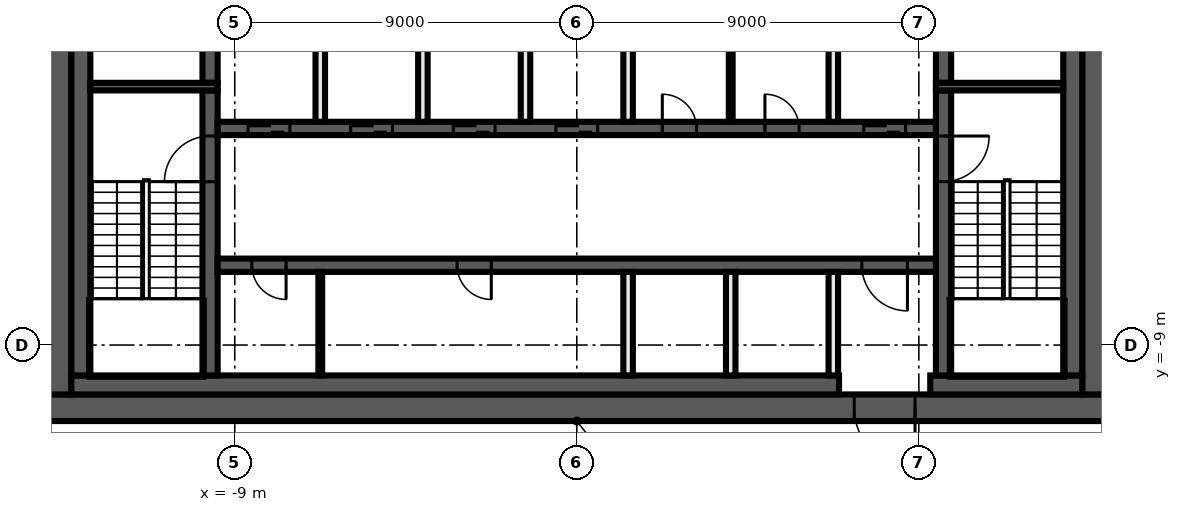
"""IFC4 building model, lengths in metres.
Left out: names, types, materials, properties, quantities, classifications, styles, units other than length and angle.
Written with IfcOpenShell. Run it as: python <this file> out.ifc"""

import sys

from ifc_helpers import new_model, si_unit, direction, frame, frame_2d, origin, place, context, subcontext, project, spatial, rectangle, extrude, element, fill, save


model = new_model("IFC4")
c1 = context("Model", 3, precision=1e-05, world=origin(), true_north=direction((0.0, 1.0)))
c2 = subcontext(c1, "Body", "Model", "MODEL_VIEW")
j1 = project(units=[si_unit("LENGTHUNIT", "METRE"), si_unit("PLANEANGLEUNIT", "RADIAN")], contexts=[c1])
p1 = place(None, origin())
s1 = spatial("IfcSite", under=j1, at=p1, CompositionType="ELEMENT")
p2 = place(p1, origin())
s2 = spatial("IfcBuilding", under=s1, at=p2, CompositionType="ELEMENT")
p3 = place(p2, frame((0.0, 0.0, 253.8)))
s3 = spatial("IfcBuildingStorey", under=s2, at=p3, CompositionType="ELEMENT", Elevation=253.8)
p4 = place(p3, frame((14.0, -10.65, 0.0), z_axis=(0.0, 0.0, 1.0), x_axis=(-1.0, 0.0, 0.0)))
e1 = element("IfcWall", 1, at=p4, inside=s3, PredefinedType="SHEAR", context=c2, shape_type="SweptSolid", body=[
    extrude(rectangle(XDim=28.0, YDim=0.7, at=frame_2d((14.0, 0.0))), origin(), (0.0, 0.0, 1.0), 3.82),
])
p5 = place(p4, frame((5.1, 0.0, 0.0)))
e2 = element("IfcOpeningElement", 2, at=p5, cuts=e1, PredefinedType="OPENING", context=c2, shape_type="SweptSolid", body=[
    extrude(rectangle(XDim=1.6, YDim=2.1, at=frame_2d((0.8, 1.05))), frame((0.0, 0.36, 0.0), z_axis=(0.0, -1.0, 0.0), x_axis=(1.0, 0.0, 0.0)), (0.0, 0.0, 1.0), 0.72),
])
for number, where, z_axis, x_axis in (
    (3, (13.65, 10.3, 0.0), (0.0, 0.0, 1.0), (0.0, -1.0, 0.0)),
    (4, (-13.65, -10.3, 0.0), (0.0, 0.0, 1.0), (0.0, 1.0, 0.0)),
):
    element("IfcWall", number, at=place(p3, frame(where, z_axis=z_axis, x_axis=x_axis)), inside=s3, PredefinedType="SHEAR", context=c2, shape_type="SweptSolid", body=[
        extrude(rectangle(XDim=20.6, YDim=0.7, at=frame_2d((10.3, 0.0))), origin(), (0.0, 0.0, 1.0), 3.82),
    ])
p6 = place(p3, frame((13.3, -10.05, 0.0), z_axis=(0.0, 0.0, 1.0), x_axis=(-1.0, 0.0, 0.0)))
e5 = element("IfcWall", 5, at=p6, inside=s3, PredefinedType="SHEAR", context=c2, shape_type="SweptSolid", body=[
    extrude(rectangle(XDim=4.0, YDim=0.5, at=frame_2d((2.0, 0.0))), origin(), (0.0, 0.0, 1.0), 3.82),
])
p7 = place(p3, frame((6.9, -10.05, 0.0), z_axis=(0.0, 0.0, 1.0), x_axis=(-1.0, 0.0, 0.0)))
e6 = element("IfcWall", 6, at=p7, inside=s3, PredefinedType="SHEAR", context=c2, shape_type="SweptSolid", body=[
    extrude(rectangle(XDim=20.2, YDim=0.5, at=frame_2d((10.1, 0.0))), origin(), (0.0, 0.0, 1.0), 3.82),
])
for number, where, z_axis, x_axis in (
    (7, (13.05, 9.8, 0.0), (0.0, 0.0, 1.0), (0.0, -1.0, 0.0)),
    (8, (-13.05, -9.8, 0.0), (0.0, 0.0, 1.0), (0.0, 1.0, 0.0)),
):
    element("IfcWall", number, at=place(p3, frame(where, z_axis=z_axis, x_axis=x_axis)), inside=s3, PredefinedType="SHEAR", context=c2, shape_type="SweptSolid", body=[
        extrude(rectangle(XDim=19.6, YDim=0.5, at=frame_2d((9.8, 0.0))), origin(), (0.0, 0.0, 1.0), 3.82),
    ])
p8 = place(p3, frame((9.65, -2.3, 0.0), z_axis=(0.0, 0.0, 1.0), x_axis=(0.0, -1.0, 0.0)))
e9 = element("IfcWall", 9, at=p8, inside=s3, PredefinedType="SHEAR", context=c2, shape_type="SweptSolid", body=[
    extrude(rectangle(XDim=7.5, YDim=0.4, at=frame_2d((3.75, 0.0))), origin(), (0.0, 0.0, 1.0), 3.82),
])
p9 = place(p8, frame((1.2, 0.0, 0.0)))
e10 = element("IfcOpeningElement", 10, at=p9, cuts=e9, PredefinedType="OPENING", context=c2, shape_type="SweptSolid", body=[
    extrude(rectangle(XDim=1.2, YDim=2.1, at=frame_2d((0.6, 1.05))), frame((0.0, 0.21, 0.0), z_axis=(0.0, -1.0, 0.0), x_axis=(1.0, 0.0, 0.0)), (0.0, 0.0, 1.0), 0.42),
])
p10 = place(p3, frame((9.65, 2.1, 0.0), z_axis=(0.0, 0.0, 1.0), x_axis=(0.0, -1.0, 0.0)))
e11 = element("IfcWall", 11, at=p10, inside=s3, PredefinedType="SHEAR", context=c2, shape_type="SweptSolid", body=[
    extrude(rectangle(XDim=4.2, YDim=0.4, at=frame_2d((2.1, 0.0))), origin(), (0.0, 0.0, 1.0), 3.82),
])
p11 = place(p10, frame((0.15, 0.0, 0.0)))
e12 = element("IfcOpeningElement", 12, at=p11, cuts=e11, PredefinedType="OPENING", context=c2, shape_type="SweptSolid", body=[
    extrude(rectangle(XDim=0.9, YDim=2.1, at=frame_2d((0.45, 1.05))), frame((0.0, 0.21, 0.0), z_axis=(0.0, -1.0, 0.0), x_axis=(1.0, 0.0, 0.0)), (0.0, 0.0, 1.0), 0.42),
])
p12 = place(p3, frame((-9.65, -9.8, 0.0), z_axis=(0.0, 0.0, 1.0), x_axis=(0.0, 1.0, 0.0)))
e13 = element("IfcWall", 13, at=p12, inside=s3, PredefinedType="SHEAR", context=c2, shape_type="SweptSolid", body=[
    extrude(rectangle(XDim=7.5, YDim=0.4, at=frame_2d((3.75, 0.0))), origin(), (0.0, 0.0, 1.0), 3.82),
])
p13 = place(p12, frame((5.1, 0.0, 0.0)))
e14 = element("IfcOpeningElement", 14, at=p13, cuts=e13, PredefinedType="OPENING", context=c2, shape_type="SweptSolid", body=[
    extrude(rectangle(XDim=1.2, YDim=2.1, at=frame_2d((0.6, 1.05))), frame((0.0, 0.21, 0.0), z_axis=(0.0, -1.0, 0.0), x_axis=(1.0, 0.0, 0.0)), (0.0, 0.0, 1.0), 0.42),
])
p14 = place(p3, frame((-9.65, -2.1, 0.0), z_axis=(0.0, 0.0, 1.0), x_axis=(0.0, 1.0, 0.0)))
e15 = element("IfcWall", 15, at=p14, inside=s3, PredefinedType="SHEAR", context=c2, shape_type="SweptSolid", body=[
    extrude(rectangle(XDim=4.2, YDim=0.4, at=frame_2d((2.1, 0.0))), origin(), (0.0, 0.0, 1.0), 3.82),
])
for number, where, z_axis, x_axis in (
    (16, (9.45, -2.2, 0.0), (0.0, 0.0, 1.0), (1.0, 0.0, 0.0)),
    (17, (-9.45, -2.2, 0.0), (0.0, 0.0, 1.0), (-1.0, 0.0, 0.0)),
):
    element("IfcWall", number, at=place(p3, frame(where, z_axis=z_axis, x_axis=x_axis)), inside=s3, PredefinedType="SHEAR", context=c2, shape_type="SweptSolid", body=[
        extrude(rectangle(XDim=3.35, YDim=0.2, at=frame_2d((1.675, 0.0))), origin(), (0.0, 0.0, 1.0), 3.82),
    ])
p15 = place(p3, frame((-9.45, -3.3, 0.0), z_axis=(0.0, 0.0, 1.0), x_axis=(1.0, 0.0, 0.0)))
e18 = element("IfcWall", 18, at=p15, inside=s3, PredefinedType="SHEAR", context=c2, shape_type="SweptSolid", body=[
    extrude(rectangle(XDim=18.9, YDim=0.35, at=frame_2d((9.45, 0.0))), origin(), (0.0, 0.0, 1.0), 3.82),
])
p16 = place(p15, frame((0.8, 0.0, 0.0)))
e19 = element("IfcOpeningElement", 19, at=p16, cuts=e18, PredefinedType="OPENING", context=c2, shape_type="SweptSolid", body=[
    extrude(rectangle(XDim=1.1, YDim=2.1, at=frame_2d((0.55, 1.05))), frame((0.0, 0.185, 0.0), z_axis=(0.0, -1.0, 0.0), x_axis=(1.0, 0.0, 0.0)), (0.0, 0.0, 1.0), 0.37),
])
p17 = place(p15, frame((3.5, 0.0, 0.0)))
e20 = element("IfcOpeningElement", 20, at=p17, cuts=e18, PredefinedType="OPENING", context=c2, shape_type="SweptSolid", body=[
    extrude(rectangle(XDim=1.1, YDim=2.1, at=frame_2d((0.55, 1.05))), frame((0.0, 0.185, 0.0), z_axis=(0.0, -1.0, 0.0), x_axis=(1.0, 0.0, 0.0)), (0.0, 0.0, 1.0), 0.37),
])
p18 = place(p15, frame((6.2, 0.0, 0.0)))
e21 = element("IfcOpeningElement", 21, at=p18, cuts=e18, PredefinedType="OPENING", context=c2, shape_type="SweptSolid", body=[
    extrude(rectangle(XDim=1.1, YDim=2.1, at=frame_2d((0.55, 1.05))), frame((0.0, 0.185, 0.0), z_axis=(0.0, -1.0, 0.0), x_axis=(1.0, 0.0, 0.0)), (0.0, 0.0, 1.0), 0.37),
])
p19 = place(p15, frame((8.9, 0.0, 0.0)))
e22 = element("IfcOpeningElement", 22, at=p19, cuts=e18, PredefinedType="OPENING", context=c2, shape_type="SweptSolid", body=[
    extrude(rectangle(XDim=1.1, YDim=2.1, at=frame_2d((0.55, 1.05))), frame((0.0, 0.185, 0.0), z_axis=(0.0, -1.0, 0.0), x_axis=(1.0, 0.0, 0.0)), (0.0, 0.0, 1.0), 0.37),
])
p20 = place(p15, frame((17.0, 0.0, 0.0)))
e23 = element("IfcOpeningElement", 23, at=p20, cuts=e18, PredefinedType="OPENING", context=c2, shape_type="SweptSolid", body=[
    extrude(rectangle(XDim=1.1, YDim=2.1, at=frame_2d((0.55, 1.05))), frame((0.0, 0.185, 0.0), z_axis=(0.0, -1.0, 0.0), x_axis=(1.0, 0.0, 0.0)), (0.0, 0.0, 1.0), 0.37),
])
p21 = place(p15, frame((11.7, 0.0, 0.0)))
e24 = element("IfcOpeningElement", 24, at=p21, cuts=e18, PredefinedType="OPENING", context=c2, shape_type="SweptSolid", body=[
    extrude(rectangle(XDim=0.9, YDim=2.1, at=frame_2d((0.45, 1.05))), frame((0.0, 0.185, 0.0), z_axis=(0.0, -1.0, 0.0), x_axis=(1.0, 0.0, 0.0)), (0.0, 0.0, 1.0), 0.37),
])
p22 = place(p15, frame((14.4, 0.0, 0.0)))
e25 = element("IfcOpeningElement", 25, at=p22, cuts=e18, PredefinedType="OPENING", context=c2, shape_type="SweptSolid", body=[
    extrude(rectangle(XDim=0.9, YDim=2.1, at=frame_2d((0.45, 1.05))), frame((0.0, 0.185, 0.0), z_axis=(0.0, -1.0, 0.0), x_axis=(1.0, 0.0, 0.0)), (0.0, 0.0, 1.0), 0.37),
])
p23 = place(p3, frame((9.45, -6.9, 0.0), z_axis=(0.0, 0.0, 1.0), x_axis=(-1.0, 0.0, 0.0)))
e26 = element("IfcWall", 26, at=p23, inside=s3, PredefinedType="SHEAR", context=c2, shape_type="SweptSolid", body=[
    extrude(rectangle(XDim=18.9, YDim=0.35, at=frame_2d((9.45, 0.0))), origin(), (0.0, 0.0, 1.0), 3.82),
])
p24 = place(p23, frame((0.75, 0.0, 0.0)))
e27 = element("IfcOpeningElement", 27, at=p24, cuts=e26, PredefinedType="OPENING", context=c2, shape_type="SweptSolid", body=[
    extrude(rectangle(XDim=1.2, YDim=2.1, at=frame_2d((0.6, 1.05))), frame((0.0, 0.185, 0.0), z_axis=(0.0, -1.0, 0.0), x_axis=(1.0, 0.0, 0.0)), (0.0, 0.0, 1.0), 0.37),
])
p25 = place(p23, frame((17.1, 0.0, 0.0)))
e28 = element("IfcOpeningElement", 28, at=p25, cuts=e26, PredefinedType="OPENING", context=c2, shape_type="SweptSolid", body=[
    extrude(rectangle(XDim=0.9, YDim=2.1, at=frame_2d((0.45, 1.05))), frame((0.0, 0.185, 0.0), z_axis=(0.0, -1.0, 0.0), x_axis=(1.0, 0.0, 0.0)), (0.0, 0.0, 1.0), 0.37),
])
p26 = place(p23, frame((11.7, 0.0, 0.0)))
e29 = element("IfcOpeningElement", 29, at=p26, cuts=e26, PredefinedType="OPENING", context=c2, shape_type="SweptSolid", body=[
    extrude(rectangle(XDim=0.9, YDim=2.1, at=frame_2d((0.45, 1.05))), frame((0.0, 0.185, 0.0), z_axis=(0.0, -1.0, 0.0), x_axis=(1.0, 0.0, 0.0)), (0.0, 0.0, 1.0), 0.37),
])
for number, where, z_axis, x_axis in (
    (30, (6.75, -9.8, 0.0), (0.0, 0.0, 1.0), (0.0, 1.0, 0.0)),
    (31, (6.75, -3.125, 0.0), (0.0, 0.0, 1.0), (0.0, 1.0, 0.0)),
):
    element("IfcWall", number, at=place(p3, frame(where, z_axis=z_axis, x_axis=x_axis)), inside=s3, PredefinedType="SOLIDWALL", context=c2, shape_type="SweptSolid", body=[
        extrude(rectangle(XDim=2.725, YDim=0.25, at=frame_2d((1.363, 0.0))), origin(), (0.0, 0.0, 1.0), 3.82),
    ])
p27 = place(p3, frame((4.05, -3.125, 0.0), z_axis=(0.0, 0.0, 1.0), x_axis=(0.0, 1.0, 0.0)))
e32 = element("IfcWall", 32, at=p27, inside=s3, PredefinedType="PARTITIONING", context=c2, shape_type="SweptSolid", body=[
    extrude(rectangle(XDim=2.725, YDim=0.1, at=frame_2d((1.363, 0.0))), origin(), (0.0, 0.0, 1.0), 3.82),
])
for number, where, z_axis, x_axis in (
    (33, (4.05, -9.8, 0.0), (0.0, 0.0, 1.0), (0.0, 1.0, 0.0)),
    (34, (1.35, -9.8, 0.0), (0.0, 0.0, 1.0), (0.0, 1.0, 0.0)),
    (35, (1.35, -3.125, 0.0), (0.0, 0.0, 1.0), (0.0, 1.0, 0.0)),
    (36, (-1.35, -3.125, 0.0), (0.0, 0.0, 1.0), (0.0, 1.0, 0.0)),
    (37, (-4.05, -3.125, 0.0), (0.0, 0.0, 1.0), (0.0, 1.0, 0.0)),
):
    element("IfcWall", number, at=place(p3, frame(where, z_axis=z_axis, x_axis=x_axis)), inside=s3, PredefinedType="SOLIDWALL", context=c2, shape_type="SweptSolid", body=[
        extrude(rectangle(XDim=2.725, YDim=0.25, at=frame_2d((1.363, 0.0))), origin(), (0.0, 0.0, 1.0), 3.82),
    ])
p28 = place(p3, frame((-6.75, -9.8, 0.0), z_axis=(0.0, 0.0, 1.0), x_axis=(0.0, 1.0, 0.0)))
e38 = element("IfcWall", 38, at=p28, inside=s3, PredefinedType="PARTITIONING", context=c2, shape_type="SweptSolid", body=[
    extrude(rectangle(XDim=2.725, YDim=0.1, at=frame_2d((1.363, 0.0))), origin(), (0.0, 0.0, 1.0), 3.82),
])
p29 = place(p3, frame((-6.75, -3.125, 0.0), z_axis=(0.0, 0.0, 1.0), x_axis=(0.0, 1.0, 0.0)))
e39 = element("IfcWall", 39, at=p29, inside=s3, PredefinedType="SOLIDWALL", context=c2, shape_type="SweptSolid", body=[
    extrude(rectangle(XDim=2.725, YDim=0.25, at=frame_2d((1.363, 0.0))), origin(), (0.0, 0.0, 1.0), 3.82),
])
p30 = place(p16, origin())
e40 = element("IfcDoor", 40, at=p30, inside=s3, OperationType="DOUBLE_DOOR_SLIDING", PredefinedType="DOOR", context=c2, shape_type="SweptSolid", body=[
    extrude(rectangle(XDim=1.1, YDim=2.1, at=frame_2d((0.55, 1.05))), frame((0.0, 0.025, 0.0), z_axis=(0.0, -1.0, 0.0), x_axis=(1.0, 0.0, 0.0)), (0.0, 0.0, 1.0), 0.05),
])
fill(e19, e40)
p31 = place(p17, origin())
e41 = element("IfcDoor", 41, at=p31, inside=s3, OperationType="DOUBLE_DOOR_SLIDING", PredefinedType="DOOR", context=c2, shape_type="SweptSolid", body=[
    extrude(rectangle(XDim=1.1, YDim=2.1, at=frame_2d((0.55, 1.05))), frame((0.0, 0.025, 0.0), z_axis=(0.0, -1.0, 0.0), x_axis=(1.0, 0.0, 0.0)), (0.0, 0.0, 1.0), 0.05),
])
fill(e20, e41)
p32 = place(p18, origin())
e42 = element("IfcDoor", 42, at=p32, inside=s3, OperationType="DOUBLE_DOOR_SLIDING", PredefinedType="DOOR", context=c2, shape_type="SweptSolid", body=[
    extrude(rectangle(XDim=1.1, YDim=2.1, at=frame_2d((0.55, 1.05))), frame((0.0, 0.025, 0.0), z_axis=(0.0, -1.0, 0.0), x_axis=(1.0, 0.0, 0.0)), (0.0, 0.0, 1.0), 0.05),
])
fill(e21, e42)
p33 = place(p19, origin())
e43 = element("IfcDoor", 43, at=p33, inside=s3, OperationType="DOUBLE_DOOR_SLIDING", PredefinedType="DOOR", context=c2, shape_type="SweptSolid", body=[
    extrude(rectangle(XDim=1.1, YDim=2.1, at=frame_2d((0.55, 1.05))), frame((0.0, 0.025, 0.0), z_axis=(0.0, -1.0, 0.0), x_axis=(1.0, 0.0, 0.0)), (0.0, 0.0, 1.0), 0.05),
])
fill(e22, e43)
p34 = place(p20, origin())
e44 = element("IfcDoor", 44, at=p34, inside=s3, OperationType="DOUBLE_DOOR_SLIDING", PredefinedType="DOOR", context=c2, shape_type="SweptSolid", body=[
    extrude(rectangle(XDim=1.1, YDim=2.1, at=frame_2d((0.55, 1.05))), frame((0.0, 0.025, 0.0), z_axis=(0.0, -1.0, 0.0), x_axis=(1.0, 0.0, 0.0)), (0.0, 0.0, 1.0), 0.05),
])
fill(e23, e44)
p35 = place(p5, origin())
e45 = element("IfcDoor", 45, at=p35, inside=s3, OperationType="DOUBLE_DOOR_SINGLE_SWING", PredefinedType="DOOR", context=c2, shape_type="SweptSolid", body=[
    extrude(rectangle(XDim=1.6, YDim=2.1, at=frame_2d((0.8, 1.05))), frame((0.0, 0.025, 0.0), z_axis=(0.0, -1.0, 0.0), x_axis=(1.0, 0.0, 0.0)), (0.0, 0.0, 1.0), 0.05),
])
fill(e2, e45)
p36 = place(p24, origin())
e46 = element("IfcDoor", 46, at=p36, inside=s3, OperationType="SINGLE_SWING_LEFT", PredefinedType="DOOR", context=c2, shape_type="SweptSolid", body=[
    extrude(rectangle(XDim=1.2, YDim=2.1, at=frame_2d((0.6, 1.05))), frame((0.0, 0.025, 0.0), z_axis=(0.0, -1.0, 0.0), x_axis=(1.0, 0.0, 0.0)), (0.0, 0.0, 1.0), 0.05),
])
fill(e27, e46)
p37 = place(p21, origin())
e47 = element("IfcDoor", 47, at=p37, inside=s3, OperationType="SINGLE_SWING_RIGHT", PredefinedType="DOOR", context=c2, shape_type="SweptSolid", body=[
    extrude(rectangle(XDim=0.9, YDim=2.1, at=frame_2d((0.45, 1.05))), frame((0.0, 0.025, 0.0), z_axis=(0.0, -1.0, 0.0), x_axis=(1.0, 0.0, 0.0)), (0.0, 0.0, 1.0), 0.05),
])
fill(e24, e47)
p38 = place(p22, origin())
e48 = element("IfcDoor", 48, at=p38, inside=s3, OperationType="SINGLE_SWING_LEFT", PredefinedType="DOOR", context=c2, shape_type="SweptSolid", body=[
    extrude(rectangle(XDim=0.9, YDim=2.1, at=frame_2d((0.45, 1.05))), frame((0.0, 0.025, 0.0), z_axis=(0.0, -1.0, 0.0), x_axis=(1.0, 0.0, 0.0)), (0.0, 0.0, 1.0), 0.05),
])
fill(e25, e48)
p39 = place(p25, origin())
e49 = element("IfcDoor", 49, at=p39, inside=s3, OperationType="SINGLE_SWING_RIGHT", PredefinedType="DOOR", context=c2, shape_type="SweptSolid", body=[
    extrude(rectangle(XDim=0.9, YDim=2.1, at=frame_2d((0.45, 1.05))), frame((0.0, 0.025, 0.0), z_axis=(0.0, -1.0, 0.0), x_axis=(1.0, 0.0, 0.0)), (0.0, 0.0, 1.0), 0.05),
])
fill(e28, e49)
p40 = place(p26, origin())
e50 = element("IfcDoor", 50, at=p40, inside=s3, OperationType="SINGLE_SWING_LEFT", PredefinedType="DOOR", context=c2, shape_type="SweptSolid", body=[
    extrude(rectangle(XDim=0.9, YDim=2.1, at=frame_2d((0.45, 1.05))), frame((0.0, 0.025, 0.0), z_axis=(0.0, -1.0, 0.0), x_axis=(1.0, 0.0, 0.0)), (0.0, 0.0, 1.0), 0.05),
])
fill(e29, e50)
p41 = place(p9, origin())
e51 = element("IfcDoor", 51, at=p41, inside=s3, OperationType="SINGLE_SWING_RIGHT", PredefinedType="DOOR", context=c2, shape_type="SweptSolid", body=[
    extrude(rectangle(XDim=1.2, YDim=2.1, at=frame_2d((0.6, 1.05))), frame((0.0, 0.025, 0.0), z_axis=(0.0, -1.0, 0.0), x_axis=(1.0, 0.0, 0.0)), (0.0, 0.0, 1.0), 0.05),
])
fill(e10, e51)
p42 = place(p13, origin())
e52 = element("IfcDoor", 52, at=p42, inside=s3, OperationType="SINGLE_SWING_LEFT", PredefinedType="DOOR", context=c2, shape_type="SweptSolid", body=[
    extrude(rectangle(XDim=1.2, YDim=2.1, at=frame_2d((0.6, 1.05))), frame((0.0, 0.025, 0.0), z_axis=(0.0, -1.0, 0.0), x_axis=(1.0, 0.0, 0.0)), (0.0, 0.0, 1.0), 0.05),
])
fill(e14, e52)
save(model, sys.argv[1])
